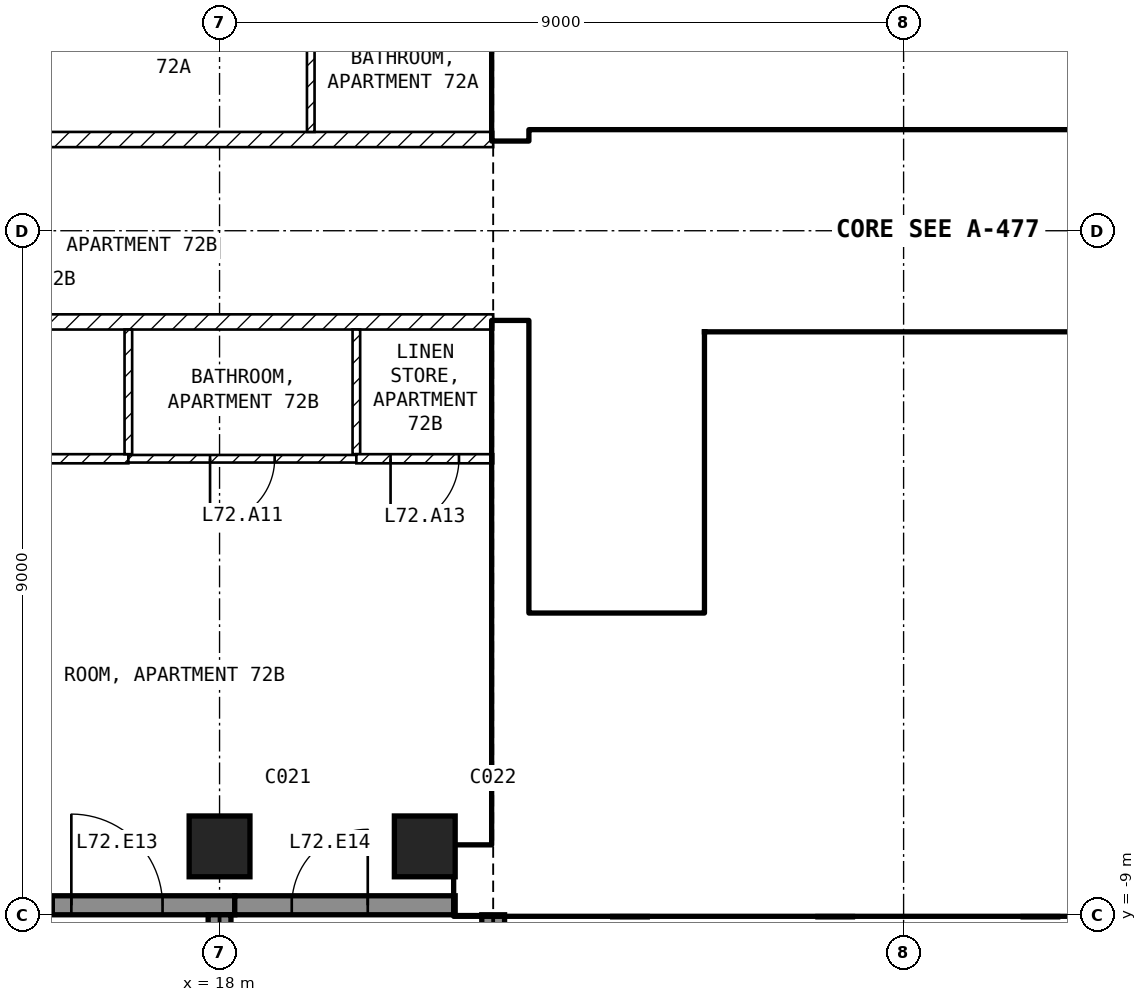
"""IFC4 building model, lengths in metres.
Left out: names, types, materials, properties, quantities, classifications, styles, units other than length and angle.
Written with IfcOpenShell. Run it as: python <this file> out.ifc"""

import sys

from ifc_helpers import new_model, si_unit, direction, frame, frame_2d, origin, origin_2d, place, context, subcontext, project, spatial, rectangle, extrude, element, fill, save


model = new_model("IFC4")
c1 = context("Model", 3, precision=1e-05, world=origin(), true_north=direction((0.0, 1.0)))
c2 = subcontext(c1, "Body", "Model", "MODEL_VIEW")
j1 = project(units=[si_unit("LENGTHUNIT", "METRE"), si_unit("PLANEANGLEUNIT", "RADIAN")], contexts=[c1])
p1 = place(None, origin())
s1 = spatial("IfcSite", under=j1, at=p1, CompositionType="ELEMENT")
p2 = place(p1, origin())
s2 = spatial("IfcBuilding", under=s1, at=p2, CompositionType="ELEMENT")
p3 = place(p2, frame((0.0, 0.0, 281.5)))
s3 = spatial("IfcBuildingStorey", under=s2, at=p3, CompositionType="ELEMENT", Elevation=281.5)
for number, where, z_axis, x_axis in (
    (1, (18.0, -8.1, -0.25), (0.0, 0.0, 1.0), (1.0, 0.0, 0.0)),
    (2, (20.7, -8.1, -0.25), (0.0, 0.0, 1.0), (1.0, 0.0, 0.0)),
):
    element("IfcColumn", number, at=place(p3, frame(where, z_axis=z_axis, x_axis=x_axis)), inside=s3, PredefinedType="COLUMN", context=c2, shape_type="SweptSolid", body=[
        extrude(rectangle(XDim=0.8, YDim=0.8, at=origin_2d()), origin(), (0.0, 0.0, 1.0), 3.45),
    ])
p4 = place(p3, frame((15.8, -8.875, 0.0), z_axis=(0.0, 0.0, 1.0), x_axis=(1.0, 0.0, 0.0)))
e3 = element("IfcWall", 3, at=p4, inside=s3, PredefinedType="SOLIDWALL", context=c2, shape_type="SweptSolid", body=[
    extrude(rectangle(XDim=2.4, YDim=0.25, at=frame_2d((1.2, 0.0))), origin(), (0.0, 0.0, 1.0), 3.2),
])
p5 = place(p4, frame((0.25, 0.0, 0.0)))
e4 = element("IfcOpeningElement", 4, at=p5, cuts=e3, PredefinedType="OPENING", context=c2, shape_type="SweptSolid", body=[
    extrude(rectangle(XDim=1.2, YDim=2.4, at=frame_2d((0.6, 1.2))), frame((0.0, 0.135, 0.0), z_axis=(0.0, -1.0, 0.0), x_axis=(1.0, 0.0, 0.0)), (0.0, 0.0, 1.0), 0.27),
])
p6 = place(p3, frame((18.2, -8.875, 0.0), z_axis=(0.0, 0.0, 1.0), x_axis=(1.0, 0.0, 0.0)))
e5 = element("IfcWall", 5, at=p6, inside=s3, PredefinedType="SOLIDWALL", context=c2, shape_type="SweptSolid", body=[
    extrude(rectangle(XDim=2.9, YDim=0.25, at=frame_2d((1.45, 0.0))), origin(), (0.0, 0.0, 1.0), 3.2),
])
p7 = place(p6, frame((0.75, 0.0, 0.0)))
e6 = element("IfcOpeningElement", 6, at=p7, cuts=e5, PredefinedType="OPENING", context=c2, shape_type="SweptSolid", body=[
    extrude(rectangle(XDim=1.0, YDim=2.4, at=frame_2d((0.5, 1.2))), frame((0.0, 0.135, 0.0), z_axis=(0.0, -1.0, 0.0), x_axis=(1.0, 0.0, 0.0)), (0.0, 0.0, 1.0), 0.27),
])
p8 = place(p3, frame((18.0, -9.0, 0.0), z_axis=(0.0, 0.0, 1.0), x_axis=(0.0, -1.0, 0.0)))
e7 = element("IfcWall", 7, at=p8, inside=s3, PredefinedType="SOLIDWALL", context=c2, shape_type="SweptSolid", body=[
    extrude(rectangle(XDim=2.74, YDim=0.3, at=frame_2d((1.37, 0.0))), origin(), (0.0, 0.0, 1.0), 2.17),
])
p9 = place(p3, frame((21.6, -9.0, 0.0), z_axis=(0.0, 0.0, 1.0), x_axis=(0.0, -1.0, 0.0)))
e8 = element("IfcWall", 8, at=p9, inside=s3, PredefinedType="SOLIDWALL", context=c2, shape_type="SweptSolid", body=[
    extrude(rectangle(XDim=2.7, YDim=0.3, at=frame_2d((1.35, 0.0))), origin(), (0.0, 0.0, 1.0), 3.2),
])
p10 = place(p3, frame((21.1, -8.55, 0.0), z_axis=(0.0, 0.0, 1.0), x_axis=(1.0, 0.0, 0.0)))
e9 = element("IfcWall", 9, at=p10, inside=s3, PredefinedType="SHEAR", context=c2, shape_type="SweptSolid", body=[
    extrude(rectangle(XDim=9.1, YDim=0.9, at=frame_2d((4.55, 0.0))), origin(), (0.0, 0.0, 1.0), 3.2),
])
for number, where, z_axis, x_axis in (
    (10, (21.825, -8.1, 0.0), (0.0, 0.0, 1.0), (0.0, 1.0, 0.0)),
    (11, (21.825, 1.2, 0.0), (0.0, 0.0, 1.0), (0.0, 1.0, 0.0)),
):
    element("IfcWall", number, at=place(p3, frame(where, z_axis=z_axis, x_axis=x_axis)), inside=s3, PredefinedType="SHEAR", context=c2, shape_type="SweptSolid", body=[
        extrude(rectangle(XDim=6.9, YDim=0.45, at=frame_2d((3.45, 0.0))), origin(), (0.0, 0.0, 1.0), 3.2),
    ])
p11 = place(p3, frame((22.05, 1.45, 0.0), z_axis=(0.0, 0.0, 1.0), x_axis=(1.0, 0.0, 0.0)))
e12 = element("IfcWall", 12, at=p11, inside=s3, PredefinedType="SOLIDWALL", context=c2, shape_type="SweptSolid", body=[
    extrude(rectangle(XDim=11.3, YDim=0.2, at=frame_2d((5.65, 0.0))), origin(), (0.0, 0.0, 1.0), 3.2),
])
p12 = place(p11, frame((0.75, 0.0, 0.0)))
e13 = element("IfcOpeningElement", 13, at=p12, cuts=e12, PredefinedType="OPENING", context=c2, shape_type="SweptSolid", body=[
    extrude(rectangle(XDim=1.0, YDim=2.1, at=frame_2d((0.5, 1.05))), frame((0.0, 0.11, 0.0), z_axis=(0.0, -1.0, 0.0), x_axis=(1.0, 0.0, 0.0)), (0.0, 0.0, 1.0), 0.22),
])
p13 = place(p11, frame((3.25, 0.0, 0.0)))
e14 = element("IfcOpeningElement", 14, at=p13, cuts=e12, PredefinedType="OPENING", context=c2, shape_type="SweptSolid", body=[
    extrude(rectangle(XDim=1.0, YDim=2.1, at=frame_2d((0.5, 1.05))), frame((0.0, 0.11, 0.0), z_axis=(0.0, -1.0, 0.0), x_axis=(1.0, 0.0, 0.0)), (0.0, 0.0, 1.0), 0.22),
])
p14 = place(p11, frame((9.225, 0.0, 0.0)))
e15 = element("IfcOpeningElement", 15, at=p14, cuts=e12, PredefinedType="OPENING", context=c2, shape_type="SweptSolid", body=[
    extrude(rectangle(XDim=0.9, YDim=2.1, at=frame_2d((0.45, 1.05))), frame((0.0, 0.11, 0.0), z_axis=(0.0, -1.0, 0.0), x_axis=(1.0, 0.0, 0.0)), (0.0, 0.0, 1.0), 0.22),
])
p15 = place(p3, frame((24.5, -5.05, 0.0), z_axis=(0.0, 0.0, 1.0), x_axis=(0.0, 1.0, 0.0)))
e16 = element("IfcWall", 16, at=p15, inside=s3, PredefinedType="SOLIDWALL", context=c2, shape_type="SweptSolid", body=[
    extrude(rectangle(XDim=3.7, YDim=0.2, at=frame_2d((1.85, 0.0))), origin(), (0.0, 0.0, 1.0), 3.2),
])
p16 = place(p15, frame((0.1, 0.0, 0.0)))
e17 = element("IfcOpeningElement", 17, at=p16, cuts=e16, PredefinedType="OPENING", context=c2, shape_type="SweptSolid", body=[
    extrude(rectangle(XDim=0.8, YDim=2.1, at=frame_2d((0.4, 1.05))), frame((0.0, 0.11, 0.0), z_axis=(0.0, -1.0, 0.0), x_axis=(1.0, 0.0, 0.0)), (0.0, 0.0, 1.0), 0.22),
])
p17 = place(p3, frame((22.05, -5.15, 0.0), z_axis=(0.0, 0.0, 1.0), x_axis=(1.0, 0.0, 0.0)))
e18 = element("IfcWall", 18, at=p17, inside=s3, PredefinedType="SOLIDWALL", context=c2, shape_type="SweptSolid", body=[
    extrude(rectangle(XDim=6.3, YDim=0.2, at=frame_2d((3.15, 0.0))), origin(), (0.0, 0.0, 1.0), 3.2),
])
p18 = place(p17, frame((0.2, 0.0, 0.0)))
e19 = element("IfcOpeningElement", 19, at=p18, cuts=e18, PredefinedType="OPENING", context=c2, shape_type="SweptSolid", body=[
    extrude(rectangle(XDim=1.0, YDim=2.1, at=frame_2d((0.5, 1.05))), frame((0.0, 0.11, 0.0), z_axis=(0.0, -1.0, 0.0), x_axis=(1.0, 0.0, 0.0)), (0.0, 0.0, 1.0), 0.22),
])
p19 = place(p3, frame((28.25, -8.1, 0.0), z_axis=(0.0, 0.0, 1.0), x_axis=(0.0, 1.0, 0.0)))
e20 = element("IfcWall", 20, at=p19, inside=s3, PredefinedType="SOLIDWALL", context=c2, shape_type="SweptSolid", body=[
    extrude(rectangle(XDim=2.85, YDim=0.2, at=frame_2d((1.425, 0.0))), origin(), (0.0, 0.0, 1.0), 3.2),
])
p20 = place(p3, frame((24.6, -1.45, 0.0), z_axis=(0.0, 0.0, 1.0), x_axis=(1.0, 0.0, 0.0)))
e21 = element("IfcWall", 21, at=p20, inside=s3, PredefinedType="SOLIDWALL", context=c2, shape_type="SweptSolid", body=[
    extrude(rectangle(XDim=8.75, YDim=0.2, at=frame_2d((4.375, 0.0))), origin(), (0.0, 0.0, 1.0), 3.2),
])
p21 = place(p20, frame((0.4, 0.0, 0.0)))
e22 = element("IfcOpeningElement", 22, at=p21, cuts=e21, PredefinedType="OPENING", context=c2, shape_type="SweptSolid", body=[
    extrude(rectangle(XDim=1.0, YDim=2.1, at=frame_2d((0.5, 1.05))), frame((0.0, 0.11, 0.0), z_axis=(0.0, -1.0, 0.0), x_axis=(1.0, 0.0, 0.0)), (0.0, 0.0, 1.0), 0.22),
])
p22 = place(p20, frame((2.4, 0.0, 0.0)))
e23 = element("IfcOpeningElement", 23, at=p22, cuts=e21, PredefinedType="OPENING", context=c2, shape_type="SweptSolid", body=[
    extrude(rectangle(XDim=1.0, YDim=2.1, at=frame_2d((0.5, 1.05))), frame((0.0, 0.11, 0.0), z_axis=(0.0, -1.0, 0.0), x_axis=(1.0, 0.0, 0.0)), (0.0, 0.0, 1.0), 0.22),
])
p23 = place(p20, frame((4.4, 0.0, 0.0)))
e24 = element("IfcOpeningElement", 24, at=p23, cuts=e21, PredefinedType="OPENING", context=c2, shape_type="SweptSolid", body=[
    extrude(rectangle(XDim=1.0, YDim=2.1, at=frame_2d((0.5, 1.05))), frame((0.0, 0.11, 0.0), z_axis=(0.0, -1.0, 0.0), x_axis=(1.0, 0.0, 0.0)), (0.0, 0.0, 1.0), 0.22),
])
p24 = place(p20, frame((6.925, 0.0, 0.0)))
e25 = element("IfcOpeningElement", 25, at=p24, cuts=e21, PredefinedType="OPENING", context=c2, shape_type="SweptSolid", body=[
    extrude(rectangle(XDim=0.9, YDim=2.1, at=frame_2d((0.45, 1.05))), frame((0.0, 0.11, 0.0), z_axis=(0.0, -1.0, 0.0), x_axis=(1.0, 0.0, 0.0)), (0.0, 0.0, 1.0), 0.22),
])
p25 = place(p3, frame((24.6, -3.95, 0.0), z_axis=(0.0, 0.0, 1.0), x_axis=(1.0, 0.0, 0.0)))
e26 = element("IfcWall", 26, at=p25, inside=s3, PredefinedType="SOLIDWALL", context=c2, shape_type="SweptSolid", body=[
    extrude(rectangle(XDim=8.75, YDim=0.2, at=frame_2d((4.375, 0.0))), origin(), (0.0, 0.0, 1.0), 3.2),
])
p26 = place(p3, frame((27.1, 1.55, 0.0), z_axis=(0.0, 0.0, 1.0), x_axis=(0.0, 1.0, 0.0)))
e27 = element("IfcWall", 27, at=p26, inside=s3, PredefinedType="SOLIDWALL", context=c2, shape_type="SweptSolid", body=[
    extrude(rectangle(XDim=3.5, YDim=0.2, at=frame_2d((1.75, 0.0))), origin(), (0.0, 0.0, 1.0), 3.2),
])
p27 = place(p26, frame((0.6, 0.0, 0.0)))
e28 = element("IfcOpeningElement", 28, at=p27, cuts=e27, PredefinedType="OPENING", context=c2, shape_type="SweptSolid", body=[
    extrude(rectangle(XDim=1.1, YDim=2.1, at=frame_2d((0.55, 1.05))), frame((0.0, 0.11, 0.0), z_axis=(0.0, -1.0, 0.0), x_axis=(1.0, 0.0, 0.0)), (0.0, 0.0, 1.0), 0.22),
])
p28 = place(p26, frame((2.6, 0.0, 0.0)))
e29 = element("IfcOpeningElement", 29, at=p28, cuts=e27, PredefinedType="OPENING", context=c2, shape_type="SweptSolid", body=[
    extrude(rectangle(XDim=0.8, YDim=2.1, at=frame_2d((0.4, 1.05))), frame((0.0, 0.11, 0.0), z_axis=(0.0, -1.0, 0.0), x_axis=(1.0, 0.0, 0.0)), (0.0, 0.0, 1.0), 0.22),
])
for number, where, z_axis, x_axis in (
    (30, (26.5, -3.85, 0.0), (0.0, 0.0, 1.0), (0.0, 1.0, 0.0)),
    (31, (28.5, -3.85, 0.0), (0.0, 0.0, 1.0), (0.0, 1.0, 0.0)),
):
    element("IfcWall", number, at=place(p3, frame(where, z_axis=z_axis, x_axis=x_axis)), inside=s3, PredefinedType="SOLIDWALL", context=c2, shape_type="SweptSolid", body=[
        extrude(rectangle(XDim=2.3, YDim=0.2, at=frame_2d((1.15, 0.0))), origin(), (0.0, 0.0, 1.0), 3.2),
    ])
p29 = place(p3, frame((27.4, -5.05, 0.0), z_axis=(0.0, 0.0, 1.0), x_axis=(0.0, 1.0, 0.0)))
e32 = element("IfcWall", 32, at=p29, inside=s3, PredefinedType="PARTITIONING", context=c2, shape_type="SweptSolid", body=[
    extrude(rectangle(XDim=1.0, YDim=0.15, at=frame_2d((0.5, 0.0))), origin(), (0.0, 0.0, 1.0), 3.2),
])
p30 = place(p29, frame((0.1, 0.0, 0.0)))
e33 = element("IfcOpeningElement", 33, at=p30, cuts=e32, PredefinedType="OPENING", context=c2, shape_type="SweptSolid", body=[
    extrude(rectangle(XDim=0.8, YDim=2.1, at=frame_2d((0.4, 1.05))), frame((0.0, 0.085, 0.0), z_axis=(0.0, -1.0, 0.0), x_axis=(1.0, 0.0, 0.0)), (0.0, 0.0, 1.0), 0.17),
])
p31 = place(p3, frame((4.4, 1.2, 0.0), z_axis=(0.0, 0.0, 1.0), x_axis=(1.0, 0.0, 0.0)))
e34 = element("IfcWall", 34, at=p31, inside=s3, PredefinedType="PARTITIONING", context=c2, shape_type="SweptSolid", body=[
    extrude(rectangle(XDim=17.2, YDim=0.2, at=frame_2d((8.6, 0.0))), origin(), (0.0, 0.0, 1.0), 3.2),
])
p32 = place(p31, frame((5.825, 0.0, 0.0)))
e35 = element("IfcOpeningElement", 35, at=p32, cuts=e34, PredefinedType="OPENING", context=c2, shape_type="SweptSolid", body=[
    extrude(rectangle(XDim=1.0, YDim=2.1, at=frame_2d((0.5, 1.05))), frame((0.0, 0.11, 0.0), z_axis=(0.0, -1.0, 0.0), x_axis=(1.0, 0.0, 0.0)), (0.0, 0.0, 1.0), 0.22),
])
p33 = place(p3, frame((21.6, -1.2, 0.0), z_axis=(0.0, 0.0, 1.0), x_axis=(-1.0, 0.0, 0.0)))
e36 = element("IfcWall", 36, at=p33, inside=s3, PredefinedType="PARTITIONING", context=c2, shape_type="SweptSolid", body=[
    extrude(rectangle(XDim=17.2, YDim=0.2, at=frame_2d((8.6, 0.0))), origin(), (0.0, 0.0, 1.0), 3.2),
])
p34 = place(p33, frame((7.9, 0.0, 0.0)))
e37 = element("IfcOpeningElement", 37, at=p34, cuts=e36, PredefinedType="OPENING", context=c2, shape_type="SweptSolid", body=[
    extrude(rectangle(XDim=1.0, YDim=2.1, at=frame_2d((0.5, 1.05))), frame((0.0, 0.11, 0.0), z_axis=(0.0, -1.0, 0.0), x_axis=(1.0, 0.0, 0.0)), (0.0, 0.0, 1.0), 0.22),
])
p35 = place(p3, frame((19.2, 3.24, 0.0), z_axis=(0.0, 0.0, 1.0), x_axis=(0.0, -1.0, 0.0)))
e38 = element("IfcWall", 38, at=p35, inside=s3, PredefinedType="PARTITIONING", context=c2, shape_type="SweptSolid", body=[
    extrude(rectangle(XDim=1.94, YDim=0.1, at=frame_2d((0.97, 0.0))), origin(), (0.0, 0.0, 1.0), 3.2),
])
p36 = place(p3, frame((16.8, -3.0, 0.0), z_axis=(0.0, 0.0, 1.0), x_axis=(-1.0, 0.0, 0.0)))
e39 = element("IfcWall", 39, at=p36, inside=s3, PredefinedType="PARTITIONING", context=c2, shape_type="SweptSolid", body=[
    extrude(rectangle(XDim=7.86, YDim=0.12, at=frame_2d((3.93, 0.0))), origin(), (0.0, 0.0, 1.0), 3.2),
])
p37 = place(p36, frame((3.15, 0.0, 0.0)))
e40 = element("IfcOpeningElement", 40, at=p37, cuts=e39, PredefinedType="OPENING", context=c2, shape_type="SweptSolid", body=[
    extrude(rectangle(XDim=0.9, YDim=2.1, at=frame_2d((0.45, 1.05))), frame((0.0, 0.07, 0.0), z_axis=(0.0, -1.0, 0.0), x_axis=(1.0, 0.0, 0.0)), (0.0, 0.0, 1.0), 0.14),
])
for number, where, z_axis, x_axis in (
    (41, (16.8, -1.3, 0.0), (0.0, 0.0, 1.0), (0.0, -1.0, 0.0)),
    (42, (19.8, -1.3, 0.0), (0.0, 0.0, 1.0), (0.0, -1.0, 0.0)),
):
    element("IfcWall", number, at=place(p3, frame(where, z_axis=z_axis, x_axis=x_axis)), inside=s3, PredefinedType="PARTITIONING", context=c2, shape_type="SweptSolid", body=[
        extrude(rectangle(XDim=1.64, YDim=0.1, at=frame_2d((0.82, 0.0))), origin(), (0.0, 0.0, 1.0), 3.2),
    ])
p38 = place(p3, frame((19.8, -3.0, 0.0), z_axis=(0.0, 0.0, 1.0), x_axis=(-1.0, 0.0, 0.0)))
e43 = element("IfcWall", 43, at=p38, inside=s3, PredefinedType="PARTITIONING", context=c2, shape_type="SweptSolid", body=[
    extrude(rectangle(XDim=3.0, YDim=0.1, at=frame_2d((1.5, 0.0))), origin(), (0.0, 0.0, 1.0), 3.2),
])
p39 = place(p38, frame((1.075, 0.0, 0.0)))
e44 = element("IfcOpeningElement", 44, at=p39, cuts=e43, PredefinedType="OPENING", context=c2, shape_type="SweptSolid", body=[
    extrude(rectangle(XDim=0.85, YDim=2.1, at=frame_2d((0.425, 1.05))), frame((0.0, 0.06, 0.0), z_axis=(0.0, -1.0, 0.0), x_axis=(1.0, 0.0, 0.0)), (0.0, 0.0, 1.0), 0.12),
])
p40 = place(p3, frame((21.6, -3.0, 0.0), z_axis=(0.0, 0.0, 1.0), x_axis=(-1.0, 0.0, 0.0)))
e45 = element("IfcWall", 45, at=p40, inside=s3, PredefinedType="PARTITIONING", context=c2, shape_type="SweptSolid", body=[
    extrude(rectangle(XDim=1.8, YDim=0.12, at=frame_2d((0.9, 0.0))), origin(), (0.0, 0.0, 1.0), 3.2),
])
p41 = place(p40, frame((0.45, 0.0, 0.0)))
e46 = element("IfcOpeningElement", 46, at=p41, cuts=e45, PredefinedType="OPENING", context=c2, shape_type="SweptSolid", body=[
    extrude(rectangle(XDim=0.9, YDim=2.1, at=frame_2d((0.45, 1.05))), frame((0.0, 0.07, 0.0), z_axis=(0.0, -1.0, 0.0), x_axis=(1.0, 0.0, 0.0)), (0.0, 0.0, 1.0), 0.14),
])
p42 = place(p5, origin())
e47 = element("IfcDoor", 47, at=p42, inside=s3, OperationType="SINGLE_SWING_LEFT", PredefinedType="DOOR", context=c2, shape_type="SweptSolid", body=[
    extrude(rectangle(XDim=1.2, YDim=2.4, at=frame_2d((0.6, 1.2))), frame((0.0, 0.025, 0.0), z_axis=(0.0, -1.0, 0.0), x_axis=(1.0, 0.0, 0.0)), (0.0, 0.0, 1.0), 0.05),
])
fill(e4, e47)
p43 = place(p7, origin())
e48 = element("IfcDoor", 48, at=p43, inside=s3, OperationType="SINGLE_SWING_RIGHT", PredefinedType="DOOR", context=c2, shape_type="SweptSolid", body=[
    extrude(rectangle(XDim=1.0, YDim=2.4, at=frame_2d((0.5, 1.2))), frame((0.0, 0.025, 0.0), z_axis=(0.0, -1.0, 0.0), x_axis=(1.0, 0.0, 0.0)), (0.0, 0.0, 1.0), 0.05),
])
fill(e6, e48)
p44 = place(p21, origin())
e49 = element("IfcDoor", 49, at=p44, inside=s3, OperationType="DOUBLE_DOOR_SLIDING", PredefinedType="DOOR", context=c2, shape_type="SweptSolid", body=[
    extrude(rectangle(XDim=1.0, YDim=2.1, at=frame_2d((0.5, 1.05))), frame((0.0, 0.025, 0.0), z_axis=(0.0, -1.0, 0.0), x_axis=(1.0, 0.0, 0.0)), (0.0, 0.0, 1.0), 0.05),
])
fill(e22, e49)
p45 = place(p27, origin())
e50 = element("IfcDoor", 50, at=p45, inside=s3, OperationType="DOUBLE_DOOR_SLIDING", PredefinedType="DOOR", context=c2, shape_type="SweptSolid", body=[
    extrude(rectangle(XDim=1.1, YDim=2.1, at=frame_2d((0.55, 1.05))), frame((0.0, 0.025, 0.0), z_axis=(0.0, -1.0, 0.0), x_axis=(1.0, 0.0, 0.0)), (0.0, 0.0, 1.0), 0.05),
])
fill(e28, e50)
p46 = place(p22, origin())
e51 = element("IfcDoor", 51, at=p46, inside=s3, OperationType="DOUBLE_DOOR_SLIDING", PredefinedType="DOOR", context=c2, shape_type="SweptSolid", body=[
    extrude(rectangle(XDim=1.0, YDim=2.1, at=frame_2d((0.5, 1.05))), frame((0.0, 0.025, 0.0), z_axis=(0.0, -1.0, 0.0), x_axis=(1.0, 0.0, 0.0)), (0.0, 0.0, 1.0), 0.05),
])
fill(e23, e51)
p47 = place(p23, origin())
e52 = element("IfcDoor", 52, at=p47, inside=s3, OperationType="DOUBLE_DOOR_SLIDING", PredefinedType="DOOR", context=c2, shape_type="SweptSolid", body=[
    extrude(rectangle(XDim=1.0, YDim=2.1, at=frame_2d((0.5, 1.05))), frame((0.0, 0.025, 0.0), z_axis=(0.0, -1.0, 0.0), x_axis=(1.0, 0.0, 0.0)), (0.0, 0.0, 1.0), 0.05),
])
fill(e24, e52)
p48 = place(p18, origin())
e53 = element("IfcDoor", 53, at=p48, inside=s3, OperationType="SINGLE_SWING_LEFT", PredefinedType="DOOR", context=c2, shape_type="SweptSolid", body=[
    extrude(rectangle(XDim=1.0, YDim=2.1, at=frame_2d((0.5, 1.05))), frame((0.0, 0.025, 0.0), z_axis=(0.0, -1.0, 0.0), x_axis=(1.0, 0.0, 0.0)), (0.0, 0.0, 1.0), 0.05),
])
fill(e19, e53)
p49 = place(p12, origin())
e54 = element("IfcDoor", 54, at=p49, inside=s3, OperationType="SINGLE_SWING_LEFT", PredefinedType="DOOR", context=c2, shape_type="SweptSolid", body=[
    extrude(rectangle(XDim=1.0, YDim=2.1, at=frame_2d((0.5, 1.05))), frame((0.0, 0.025, 0.0), z_axis=(0.0, -1.0, 0.0), x_axis=(1.0, 0.0, 0.0)), (0.0, 0.0, 1.0), 0.05),
])
fill(e13, e54)
p50 = place(p16, origin())
e55 = element("IfcDoor", 55, at=p50, inside=s3, OperationType="SINGLE_SWING_LEFT", PredefinedType="DOOR", context=c2, shape_type="SweptSolid", body=[
    extrude(rectangle(XDim=0.8, YDim=2.1, at=frame_2d((0.4, 1.05))), frame((0.0, 0.025, 0.0), z_axis=(0.0, -1.0, 0.0), x_axis=(1.0, 0.0, 0.0)), (0.0, 0.0, 1.0), 0.05),
])
fill(e17, e55)
p51 = place(p13, origin())
e56 = element("IfcDoor", 56, at=p51, inside=s3, OperationType="SINGLE_SWING_LEFT", PredefinedType="DOOR", context=c2, shape_type="SweptSolid", body=[
    extrude(rectangle(XDim=1.0, YDim=2.1, at=frame_2d((0.5, 1.05))), frame((0.0, 0.025, 0.0), z_axis=(0.0, -1.0, 0.0), x_axis=(1.0, 0.0, 0.0)), (0.0, 0.0, 1.0), 0.05),
])
fill(e14, e56)
p52 = place(p30, origin())
e57 = element("IfcDoor", 57, at=p52, inside=s3, OperationType="SINGLE_SWING_LEFT", PredefinedType="DOOR", context=c2, shape_type="SweptSolid", body=[
    extrude(rectangle(XDim=0.8, YDim=2.1, at=frame_2d((0.4, 1.05))), frame((0.0, 0.025, 0.0), z_axis=(0.0, -1.0, 0.0), x_axis=(1.0, 0.0, 0.0)), (0.0, 0.0, 1.0), 0.05),
])
fill(e33, e57)
p53 = place(p39, origin())
e58 = element("IfcDoor", 58, at=p53, inside=s3, OperationType="SINGLE_SWING_RIGHT", PredefinedType="DOOR", context=c2, shape_type="SweptSolid", body=[
    extrude(rectangle(XDim=0.85, YDim=2.1, at=frame_2d((0.425, 1.05))), frame((0.0, 0.025, 0.0), z_axis=(0.0, -1.0, 0.0), x_axis=(1.0, 0.0, 0.0)), (0.0, 0.0, 1.0), 0.05),
])
fill(e44, e58)
p54 = place(p41, origin())
e59 = element("IfcDoor", 59, at=p54, inside=s3, OperationType="SINGLE_SWING_RIGHT", PredefinedType="DOOR", context=c2, shape_type="SweptSolid", body=[
    extrude(rectangle(XDim=0.9, YDim=2.1, at=frame_2d((0.45, 1.05))), frame((0.0, 0.025, 0.0), z_axis=(0.0, -1.0, 0.0), x_axis=(1.0, 0.0, 0.0)), (0.0, 0.0, 1.0), 0.05),
])
fill(e46, e59)
save(model, sys.argv[1])
